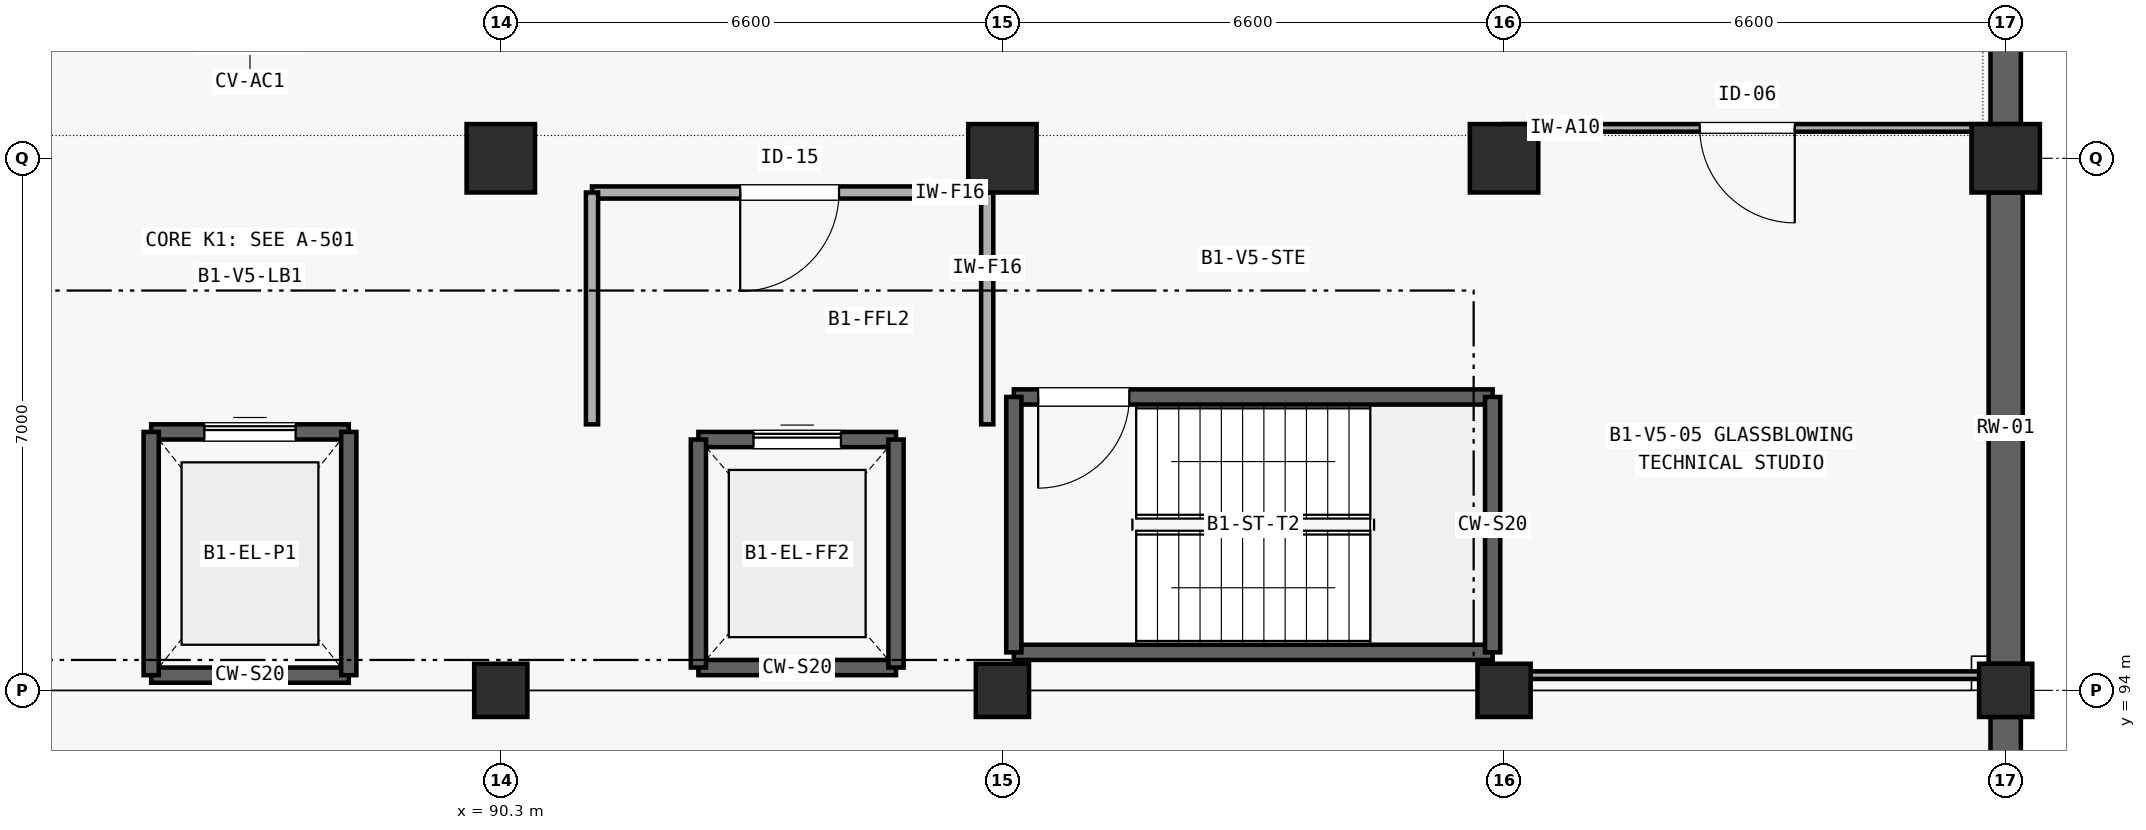
"""IFC4 building model, lengths in metres.
Left out: names, types, materials, properties, quantities, classifications, styles, units other than length and angle.
Written with IfcOpenShell. Run it as: python <this file> out.ifc"""

import sys

from ifc_helpers import new_model, si_unit, direction, frame, frame_2d, origin, origin_2d, place, context, subcontext, project, spatial, rectangle, extrude, element, fill, save


model = new_model("IFC4")
c1 = context("Model", 3, precision=1e-05, world=origin(), true_north=direction((0.0, 1.0)))
c2 = subcontext(c1, "Body", "Model", "MODEL_VIEW")
j1 = project(units=[si_unit("LENGTHUNIT", "METRE"), si_unit("PLANEANGLEUNIT", "RADIAN")], contexts=[c1])
p1 = place(None, origin())
s1 = spatial("IfcSite", under=j1, at=p1, CompositionType="ELEMENT")
p2 = place(p1, origin())
s2 = spatial("IfcBuilding", under=s1, at=p2, CompositionType="ELEMENT")
p3 = place(p2, frame((0.0, 0.0, -4.2)))
s3 = spatial("IfcBuildingStorey", under=s2, at=p3, CompositionType="ELEMENT", Elevation=-4.2)
p4 = place(p3, frame((90.3, 94.0, -0.4), z_axis=(0.0, 0.0, 1.0), x_axis=(1.0, 0.0, 0.0)))
e1 = element("IfcColumn", 1, at=p4, inside=s3, PredefinedType="COLUMN", context=c2, shape_type="SweptSolid", body=[
    extrude(rectangle(XDim=0.7, YDim=0.7, at=origin_2d()), origin(), (0.0, 0.0, 1.0), 4.6),
])
p5 = place(p3, frame((90.3, 101.0, -0.4), z_axis=(0.0, 0.0, 1.0), x_axis=(1.0, 0.0, 0.0)))
e2 = element("IfcColumn", 2, at=p5, inside=s3, PredefinedType="COLUMN", context=c2, shape_type="SweptSolid", body=[
    extrude(rectangle(XDim=0.9, YDim=0.9, at=origin_2d()), origin(), (0.0, 0.0, 1.0), 4.6),
])
p6 = place(p3, frame((96.9, 94.0, -0.4), z_axis=(0.0, 0.0, 1.0), x_axis=(1.0, 0.0, 0.0)))
e3 = element("IfcColumn", 3, at=p6, inside=s3, PredefinedType="COLUMN", context=c2, shape_type="SweptSolid", body=[
    extrude(rectangle(XDim=0.7, YDim=0.7, at=origin_2d()), origin(), (0.0, 0.0, 1.0), 4.6),
])
p7 = place(p3, frame((96.9, 101.0, -0.4), z_axis=(0.0, 0.0, 1.0), x_axis=(1.0, 0.0, 0.0)))
e4 = element("IfcColumn", 4, at=p7, inside=s3, PredefinedType="COLUMN", context=c2, shape_type="SweptSolid", body=[
    extrude(rectangle(XDim=0.9, YDim=0.9, at=origin_2d()), origin(), (0.0, 0.0, 1.0), 4.6),
])
p8 = place(p3, frame((103.5, 94.0, -0.4), z_axis=(0.0, 0.0, 1.0), x_axis=(1.0, 0.0, 0.0)))
e5 = element("IfcColumn", 5, at=p8, inside=s3, PredefinedType="COLUMN", context=c2, shape_type="SweptSolid", body=[
    extrude(rectangle(XDim=0.7, YDim=0.7, at=origin_2d()), origin(), (0.0, 0.0, 1.0), 4.6),
])
p9 = place(p3, frame((103.5, 101.0, -0.4), z_axis=(0.0, 0.0, 1.0), x_axis=(1.0, 0.0, 0.0)))
e6 = element("IfcColumn", 6, at=p9, inside=s3, PredefinedType="COLUMN", context=c2, shape_type="SweptSolid", body=[
    extrude(rectangle(XDim=0.9, YDim=0.9, at=origin_2d()), origin(), (0.0, 0.0, 1.0), 4.6),
])
p10 = place(p3, frame((110.1, 94.0, -0.4), z_axis=(0.0, 0.0, 1.0), x_axis=(1.0, 0.0, 0.0)))
e7 = element("IfcColumn", 7, at=p10, inside=s3, PredefinedType="COLUMN", context=c2, shape_type="SweptSolid", body=[
    extrude(rectangle(XDim=0.7, YDim=0.7, at=origin_2d()), origin(), (0.0, 0.0, 1.0), 4.6),
])
p11 = place(p3, frame((110.1, 101.0, -0.4), z_axis=(0.0, 0.0, 1.0), x_axis=(1.0, 0.0, 0.0)))
e8 = element("IfcColumn", 8, at=p11, inside=s3, PredefinedType="COLUMN", context=c2, shape_type="SweptSolid", body=[
    extrude(rectangle(XDim=0.9, YDim=0.9, at=origin_2d()), origin(), (0.0, 0.0, 1.0), 4.6),
])
p12 = place(p3, frame((110.1, 87.35, 0.0), z_axis=(0.0, 0.0, 1.0), x_axis=(0.0, 1.0, 0.0)))
e9 = element("IfcWall", 9, at=p12, inside=s3, PredefinedType="SHEAR", context=c2, shape_type="SweptSolid", body=[
    extrude(rectangle(XDim=6.3, YDim=0.4, at=frame_2d((3.15, 0.0))), origin(), (0.0, 0.0, 1.0), 3.85),
])
p13 = place(p3, frame((110.1, 94.35, 0.0), z_axis=(0.0, 0.0, 1.0), x_axis=(0.0, 1.0, 0.0)))
e10 = element("IfcWall", 10, at=p13, inside=s3, PredefinedType="SHEAR", context=c2, shape_type="SweptSolid", body=[
    extrude(rectangle(XDim=6.2, YDim=0.45, at=frame_2d((3.1, 0.0))), origin(), (0.0, 0.0, 1.0), 3.85),
])
p14 = place(p3, frame((110.1, 101.45, 0.0), z_axis=(0.0, 0.0, 1.0), x_axis=(0.0, 1.0, 0.0)))
e11 = element("IfcWall", 11, at=p14, inside=s3, PredefinedType="SHEAR", context=c2, shape_type="SweptSolid", body=[
    extrude(rectangle(XDim=6.1, YDim=0.4, at=frame_2d((3.05, 0.0))), origin(), (0.0, 0.0, 1.0), 3.85),
])
p15 = place(p3, frame((97.05, 94.5, -0.4), z_axis=(0.0, 0.0, 1.0), x_axis=(1.0, 0.0, 0.0)))
e12 = element("IfcWall", 12, at=p15, inside=s3, PredefinedType="SHEAR", context=c2, shape_type="SweptSolid", body=[
    extrude(rectangle(XDim=6.3, YDim=0.2, at=frame_2d((3.15, 0.0))), origin(), (0.0, 0.0, 1.0), 4.6),
])
p16 = place(p3, frame((97.05, 97.86, -0.4), z_axis=(0.0, 0.0, 1.0), x_axis=(1.0, 0.0, 0.0)))
e13 = element("IfcWall", 13, at=p16, inside=s3, PredefinedType="SHEAR", context=c2, shape_type="SweptSolid", body=[
    extrude(rectangle(XDim=6.3, YDim=0.2, at=frame_2d((3.15, 0.0))), origin(), (0.0, 0.0, 1.0), 4.6),
])
p17 = place(p16, frame((0.32, 0.0, 0.4)))
e14 = element("IfcOpeningElement", 14, at=p17, cuts=e13, PredefinedType="OPENING", context=c2, shape_type="SweptSolid", body=[
    extrude(rectangle(XDim=1.2, YDim=2.15, at=frame_2d((0.6, 1.075))), frame((0.0, 0.11, 0.0), z_axis=(0.0, -1.0, 0.0), x_axis=(1.0, 0.0, 0.0)), (0.0, 0.0, 1.0), 0.22),
])
for number, where, z_axis, x_axis in (
    (15, (97.05, 94.5, -0.4), (0.0, 0.0, 1.0), (0.0, 1.0, 0.0)),
    (16, (103.35, 94.5, -0.4), (0.0, 0.0, 1.0), (0.0, 1.0, 0.0)),
):
    element("IfcWall", number, at=place(p3, frame(where, z_axis=z_axis, x_axis=x_axis)), inside=s3, PredefinedType="SHEAR", context=c2, shape_type="SweptSolid", body=[
        extrude(rectangle(XDim=3.36, YDim=0.2, at=frame_2d((1.68, 0.0))), origin(), (0.0, 0.0, 1.0), 4.6),
    ])
p18 = place(p3, frame((92.9, 94.3, -0.4), z_axis=(0.0, 0.0, 1.0), x_axis=(1.0, 0.0, 0.0)))
e17 = element("IfcWall", 17, at=p18, inside=s3, PredefinedType="SHEAR", context=c2, shape_type="SweptSolid", body=[
    extrude(rectangle(XDim=2.6, YDim=0.2, at=frame_2d((1.3, 0.0))), origin(), (0.0, 0.0, 1.0), 4.6),
])
p19 = place(p3, frame((92.9, 97.3, -0.4), z_axis=(0.0, 0.0, 1.0), x_axis=(1.0, 0.0, 0.0)))
e18 = element("IfcWall", 18, at=p19, inside=s3, PredefinedType="SHEAR", context=c2, shape_type="SweptSolid", body=[
    extrude(rectangle(XDim=2.6, YDim=0.2, at=frame_2d((1.3, 0.0))), origin(), (0.0, 0.0, 1.0), 4.6),
])
p20 = place(p19, frame((0.725, 0.0, 0.4)))
e19 = element("IfcOpeningElement", 19, at=p20, cuts=e18, PredefinedType="OPENING", context=c2, shape_type="SweptSolid", body=[
    extrude(rectangle(XDim=1.15, YDim=2.2, at=frame_2d((0.575, 1.1))), frame((0.0, 0.11, 0.0), z_axis=(0.0, -1.0, 0.0), x_axis=(1.0, 0.0, 0.0)), (0.0, 0.0, 1.0), 0.22),
])
for number, where, z_axis, x_axis in (
    (20, (92.9, 94.3, -0.4), (0.0, 0.0, 1.0), (0.0, 1.0, 0.0)),
    (21, (95.5, 94.3, -0.4), (0.0, 0.0, 1.0), (0.0, 1.0, 0.0)),
):
    element("IfcWall", number, at=place(p3, frame(where, z_axis=z_axis, x_axis=x_axis)), inside=s3, PredefinedType="SHEAR", context=c2, shape_type="SweptSolid", body=[
        extrude(rectangle(XDim=3.0, YDim=0.2, at=frame_2d((1.5, 0.0))), origin(), (0.0, 0.0, 1.0), 4.6),
    ])
p21 = place(p3, frame((85.7, 94.2, -0.4), z_axis=(0.0, 0.0, 1.0), x_axis=(1.0, 0.0, 0.0)))
e22 = element("IfcWall", 22, at=p21, inside=s3, PredefinedType="SHEAR", context=c2, shape_type="SweptSolid", body=[
    extrude(rectangle(XDim=2.6, YDim=0.2, at=frame_2d((1.3, 0.0))), origin(), (0.0, 0.0, 1.0), 4.6),
])
p22 = place(p3, frame((85.7, 97.4, -0.4), z_axis=(0.0, 0.0, 1.0), x_axis=(1.0, 0.0, 0.0)))
e23 = element("IfcWall", 23, at=p22, inside=s3, PredefinedType="SHEAR", context=c2, shape_type="SweptSolid", body=[
    extrude(rectangle(XDim=2.6, YDim=0.2, at=frame_2d((1.3, 0.0))), origin(), (0.0, 0.0, 1.0), 4.6),
])
p23 = place(p22, frame((0.7, 0.0, 0.4)))
e24 = element("IfcOpeningElement", 24, at=p23, cuts=e23, PredefinedType="OPENING", context=c2, shape_type="SweptSolid", body=[
    extrude(rectangle(XDim=1.2, YDim=2.2, at=frame_2d((0.6, 1.1))), frame((0.0, 0.11, 0.0), z_axis=(0.0, -1.0, 0.0), x_axis=(1.0, 0.0, 0.0)), (0.0, 0.0, 1.0), 0.22),
])
for number, where, z_axis, x_axis in (
    (25, (85.7, 94.2, -0.4), (0.0, 0.0, 1.0), (0.0, 1.0, 0.0)),
    (26, (88.3, 94.2, -0.4), (0.0, 0.0, 1.0), (0.0, 1.0, 0.0)),
):
    element("IfcWall", number, at=place(p3, frame(where, z_axis=z_axis, x_axis=x_axis)), inside=s3, PredefinedType="SHEAR", context=c2, shape_type="SweptSolid", body=[
        extrude(rectangle(XDim=3.2, YDim=0.2, at=frame_2d((1.6, 0.0))), origin(), (0.0, 0.0, 1.0), 4.6),
    ])
p24 = place(p3, frame((91.5, 100.55, 0.0), z_axis=(0.0, 0.0, 1.0), x_axis=(1.0, 0.0, 0.0)))
e27 = element("IfcWall", 27, at=p24, inside=s3, PredefinedType="SOLIDWALL", context=c2, shape_type="SweptSolid", body=[
    extrude(rectangle(XDim=5.2, YDim=0.16, at=frame_2d((2.6, 0.0))), origin(), (0.0, 0.0, 1.0), 3.9),
])
p25 = place(p24, frame((1.95, 0.0, 0.0)))
e28 = element("IfcOpeningElement", 28, at=p25, cuts=e27, PredefinedType="OPENING", context=c2, shape_type="SweptSolid", body=[
    extrude(rectangle(XDim=1.3, YDim=2.15, at=frame_2d((0.65, 1.075))), frame((0.0, 0.09, 0.0), z_axis=(0.0, -1.0, 0.0), x_axis=(1.0, 0.0, 0.0)), (0.0, 0.0, 1.0), 0.18),
])
p26 = place(p3, frame((91.5, 97.5, 0.0), z_axis=(0.0, 0.0, 1.0), x_axis=(0.0, 1.0, 0.0)))
e29 = element("IfcWall", 29, at=p26, inside=s3, PredefinedType="SOLIDWALL", context=c2, shape_type="SweptSolid", body=[
    extrude(rectangle(XDim=3.05, YDim=0.16, at=frame_2d((1.525, 0.0))), origin(), (0.0, 0.0, 1.0), 3.9),
])
p27 = place(p3, frame((96.7, 97.5, 0.0), z_axis=(0.0, 0.0, 1.0), x_axis=(0.0, 1.0, 0.0)))
e30 = element("IfcWall", 30, at=p27, inside=s3, PredefinedType="SOLIDWALL", context=c2, shape_type="SweptSolid", body=[
    extrude(rectangle(XDim=3.05, YDim=0.16, at=frame_2d((1.525, 0.0))), origin(), (0.0, 0.0, 1.0), 3.405),
])
p28 = place(p3, frame((103.5, 94.2, 0.0), z_axis=(0.0, 0.0, 1.0), x_axis=(1.0, 0.0, 0.0)))
e31 = element("IfcWall", 31, at=p28, inside=s3, PredefinedType="PARTITIONING", context=c2, shape_type="SweptSolid", body=[
    extrude(rectangle(XDim=6.4, YDim=0.1, at=frame_2d((3.2, 0.0))), origin(), (0.0, 0.0, 1.0), 3.285),
])
p29 = place(p3, frame((103.5, 101.4, 0.0), z_axis=(0.0, 0.0, 1.0), x_axis=(1.0, 0.0, 0.0)))
e32 = element("IfcWall", 32, at=p29, inside=s3, PredefinedType="PARTITIONING", context=c2, shape_type="SweptSolid", body=[
    extrude(rectangle(XDim=6.4, YDim=0.1, at=frame_2d((3.2, 0.0))), origin(), (0.0, 0.0, 1.0), 3.9),
])
p30 = place(p29, frame((2.575, 0.0, 0.0)))
e33 = element("IfcOpeningElement", 33, at=p30, cuts=e32, PredefinedType="OPENING", context=c2, shape_type="SweptSolid", body=[
    extrude(rectangle(XDim=1.25, YDim=2.15, at=frame_2d((0.625, 1.075))), frame((0.0, 0.06, 0.0), z_axis=(0.0, -1.0, 0.0), x_axis=(1.0, 0.0, 0.0)), (0.0, 0.0, 1.0), 0.12),
])
p31 = place(p17, frame((1.2, 0.0, 0.0), z_axis=(0.0, 0.0, 1.0), x_axis=(-1.0, 0.0, 0.0)))
e34 = element("IfcDoor", 34, at=p31, inside=s3, OperationType="SINGLE_SWING_RIGHT", PredefinedType="DOOR", context=c2, shape_type="SweptSolid", body=[
    extrude(rectangle(XDim=1.2, YDim=2.15, at=frame_2d((0.6, 1.075))), frame((0.0, 0.025, 0.0), z_axis=(0.0, -1.0, 0.0), x_axis=(1.0, 0.0, 0.0)), (0.0, 0.0, 1.0), 0.05),
])
fill(e14, e34)
p32 = place(p20, origin())
e35 = element("IfcDoor", 35, at=p32, inside=s3, OperationType="SLIDING_TO_LEFT", PredefinedType="DOOR", context=c2, shape_type="SweptSolid", body=[
    extrude(rectangle(XDim=1.15, YDim=2.2, at=frame_2d((0.575, 1.1))), frame((0.0, 0.025, 0.0), z_axis=(0.0, -1.0, 0.0), x_axis=(1.0, 0.0, 0.0)), (0.0, 0.0, 1.0), 0.05),
])
fill(e19, e35)
p33 = place(p23, origin())
e36 = element("IfcDoor", 36, at=p33, inside=s3, OperationType="SLIDING_TO_LEFT", PredefinedType="DOOR", context=c2, shape_type="SweptSolid", body=[
    extrude(rectangle(XDim=1.2, YDim=2.2, at=frame_2d((0.6, 1.1))), frame((0.0, 0.025, 0.0), z_axis=(0.0, -1.0, 0.0), x_axis=(1.0, 0.0, 0.0)), (0.0, 0.0, 1.0), 0.05),
])
fill(e24, e36)
p34 = place(p25, frame((1.3, 0.0, 0.0), z_axis=(0.0, 0.0, 1.0), x_axis=(-1.0, 0.0, 0.0)))
e37 = element("IfcDoor", 37, at=p34, inside=s3, OperationType="SINGLE_SWING_RIGHT", PredefinedType="DOOR", context=c2, shape_type="SweptSolid", body=[
    extrude(rectangle(XDim=1.3, YDim=2.15, at=frame_2d((0.65, 1.075))), frame((0.0, 0.025, 0.0), z_axis=(0.0, -1.0, 0.0), x_axis=(1.0, 0.0, 0.0)), (0.0, 0.0, 1.0), 0.05),
])
fill(e28, e37)
p35 = place(p30, frame((1.25, 0.0, 0.0), z_axis=(0.0, 0.0, 1.0), x_axis=(-1.0, 0.0, 0.0)))
e38 = element("IfcDoor", 38, at=p35, inside=s3, OperationType="SINGLE_SWING_LEFT", PredefinedType="DOOR", context=c2, shape_type="SweptSolid", body=[
    extrude(rectangle(XDim=1.25, YDim=2.15, at=frame_2d((0.625, 1.075))), frame((0.0, 0.025, 0.0), z_axis=(0.0, -1.0, 0.0), x_axis=(1.0, 0.0, 0.0)), (0.0, 0.0, 1.0), 0.05),
])
fill(e33, e38)
save(model, sys.argv[1])
